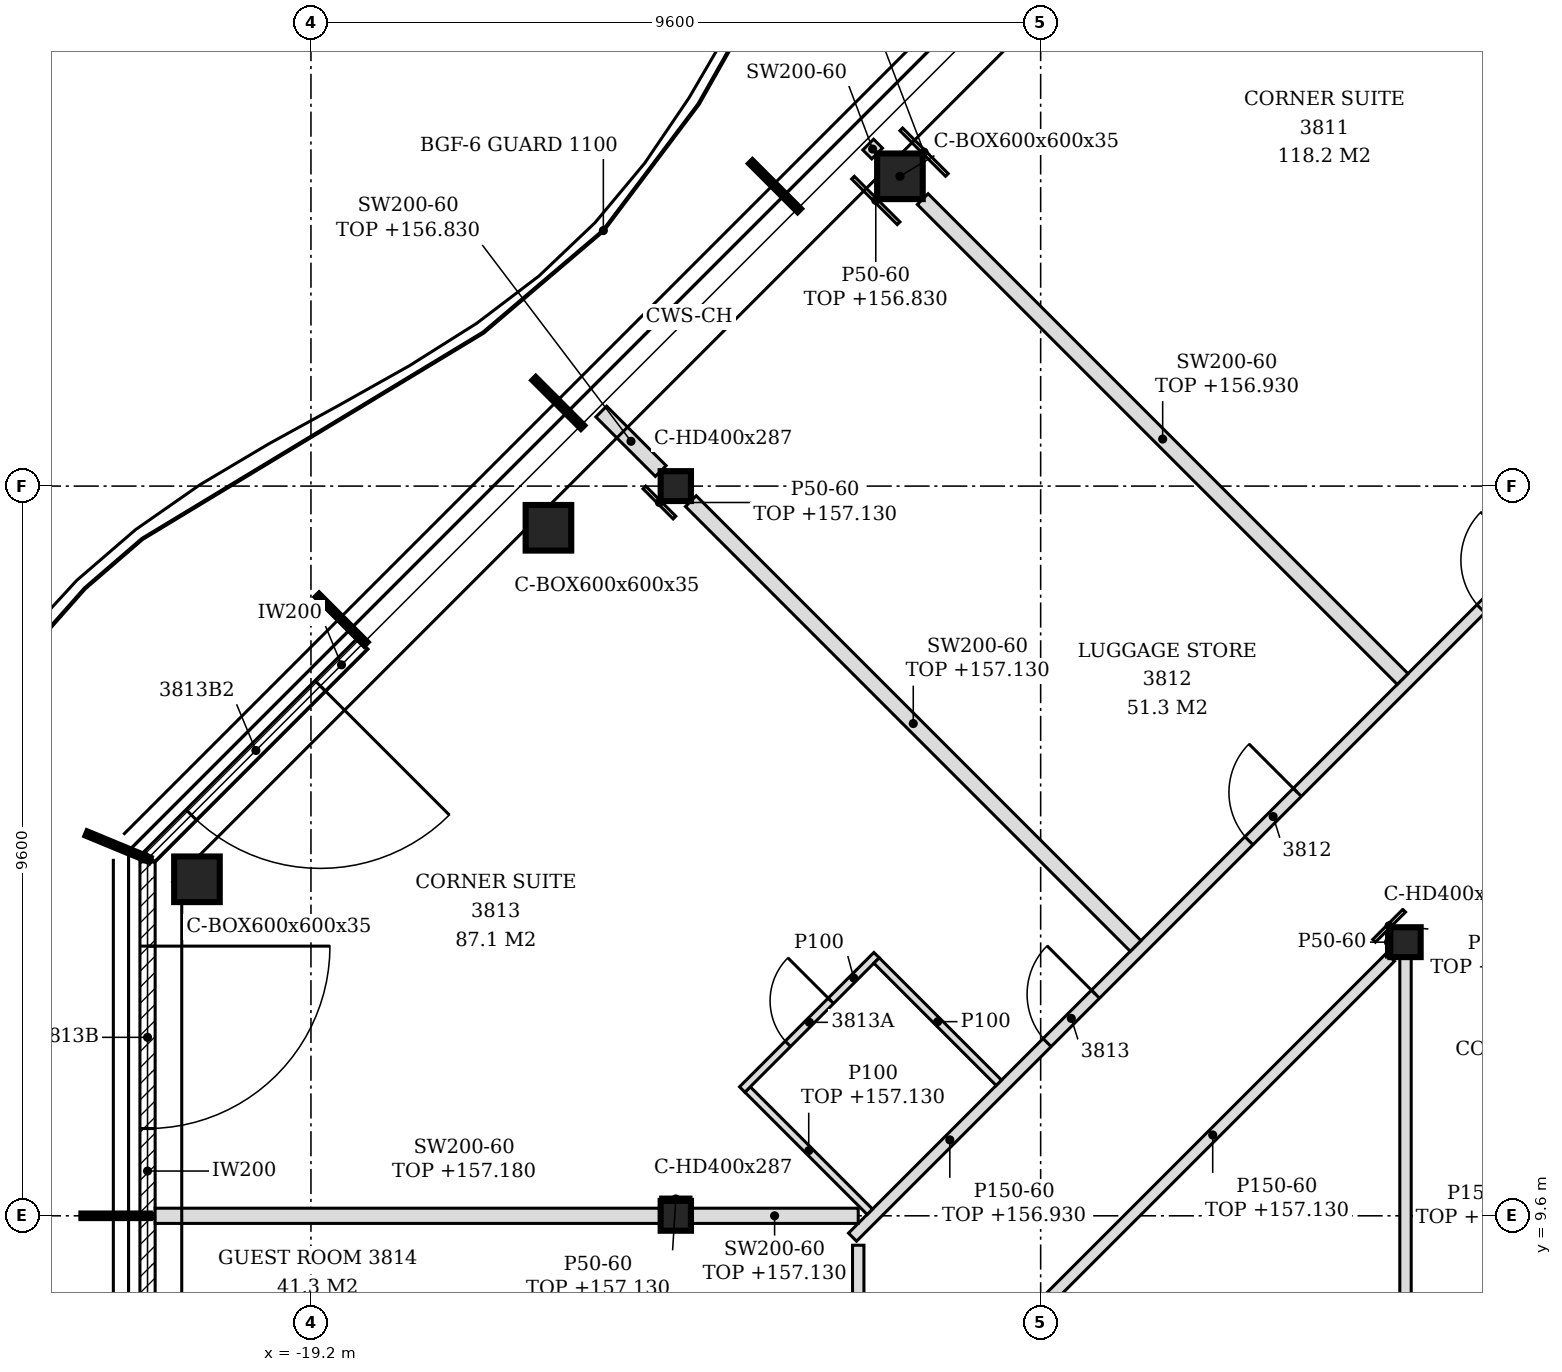
"""IFC4 building model, lengths in metres.
Left out: names, types, materials, properties, quantities, classifications, styles, units other than length and angle.
Written with IfcOpenShell. Run it as: python <this file> out.ifc"""

import sys

from ifc_helpers import new_model, si_unit, direction, frame, frame_2d, origin, origin_2d, place, context, subcontext, project, spatial, polyline, rectangle, hollow_rectangle, i_section, outline, extrude, element, fill, save


model = new_model("IFC4")
c1 = context("Model", 3, precision=1e-05, world=origin(), true_north=direction((0.0, 1.0)))
c2 = subcontext(c1, "Body", "Model", "MODEL_VIEW")
j1 = project(units=[si_unit("LENGTHUNIT", "METRE"), si_unit("PLANEANGLEUNIT", "RADIAN")], contexts=[c1])
p1 = place(None, origin())
s1 = spatial("IfcSite", under=j1, at=p1, CompositionType="ELEMENT")
p2 = place(p1, origin())
s2 = spatial("IfcBuilding", under=s1, at=p2, CompositionType="ELEMENT")
p3 = place(p2, frame((0.0, 0.0, 154.2)))
s3 = spatial("IfcBuildingStorey", under=s2, at=p3, CompositionType="ELEMENT", Elevation=154.2)
for number, where, z_axis, x_axis in (
    (1, (-11.451, 23.276, -0.15), (0.0, 0.0, 1.0), (1.0, 0.0, 0.0)),
    (2, (-16.076, 18.652, -0.15), (0.0, 0.0, 1.0), (1.0, 0.0, 0.0)),
    (3, (-20.7, 14.027, -0.15), (0.0, 0.0, 1.0), (1.0, 0.0, 0.0)),
):
    element("IfcColumn", number, at=place(p3, frame(where, z_axis=z_axis, x_axis=x_axis)), inside=s3, PredefinedType="COLUMN", context=c2, shape_type="SweptSolid", body=[
        extrude(hollow_rectangle(XDim=0.6, YDim=0.6, WallThickness=0.035, at=origin_2d()), origin(), (0.0, 0.0, 1.0), 3.6),
    ])
for number, where, z_axis, x_axis in (
    (4, (-4.8, 13.2, -0.15), (0.0, 0.0, 1.0), (1.0, 0.0, 0.0)),
    (5, (-14.4, 9.6, -0.15), (0.0, 0.0, 1.0), (1.0, 0.0, 0.0)),
    (6, (-14.4, 19.2, -0.15), (0.0, 0.0, 1.0), (1.0, 0.0, 0.0)),
):
    element("IfcColumn", number, at=place(p3, frame(where, z_axis=z_axis, x_axis=x_axis)), inside=s3, PredefinedType="COLUMN", context=c2, shape_type="SweptSolid", body=[
        extrude(i_section(OverallWidth=0.399, OverallDepth=0.393, WebThickness=0.023, FlangeThickness=0.037, FilletRadius=0.015, at=origin_2d()), origin(), (0.0, 0.0, 1.0), 3.6),
    ])
p4 = place(p3, frame((-18.521, 17.126, 0.0), z_axis=(0.0, 0.0, 1.0), x_axis=(-0.707106781187, -0.707106781187, 0.0)))
e7 = element("IfcWall", 7, at=p4, inside=s3, PredefinedType="NOTDEFINED", context=c2, shape_type="SweptSolid", body=[
    extrude(rectangle(XDim=3.962, YDim=0.2, at=frame_2d((1.981, 0.0))), origin(), (0.0, 0.0, 1.0), 3.45),
])
p5 = place(p4, frame((0.786, 0.0, 0.0)))
e8 = element("IfcOpeningElement", 8, at=p5, cuts=e7, PredefinedType="OPENING", context=c2, shape_type="SweptSolid", body=[
    extrude(rectangle(XDim=2.4, YDim=2.4, at=frame_2d((1.2, 1.2))), frame((0.0, 0.11, 0.0), z_axis=(0.0, -1.0, 0.0), x_axis=(1.0, 0.0, 0.0)), (0.0, 0.0, 1.0), 0.22),
])
p6 = place(p3, frame((-21.35, 14.256, 0.0), z_axis=(0.0, 0.0, 1.0), x_axis=(0.0, -1.0, 0.0)))
e9 = element("IfcWall", 9, at=p6, inside=s3, PredefinedType="NOTDEFINED", context=c2, shape_type="SweptSolid", body=[
    extrude(rectangle(XDim=4.626, YDim=0.2, at=frame_2d((2.313, 0.0))), origin(), (0.0, 0.0, 1.0), 3.45),
])
p7 = place(p6, frame((1.108, 0.0, 0.0)))
e10 = element("IfcOpeningElement", 10, at=p7, cuts=e9, PredefinedType="OPENING", context=c2, shape_type="SweptSolid", body=[
    extrude(rectangle(XDim=2.4, YDim=2.4, at=frame_2d((1.2, 1.2))), frame((0.0, 0.11, 0.0), z_axis=(0.0, -1.0, 0.0), x_axis=(1.0, 0.0, 0.0)), (0.0, 0.0, 1.0), 0.22),
])
p8 = place(p3, frame((-21.35, 9.57, 0.0), z_axis=(0.0, 0.0, 1.0), x_axis=(0.0, -1.0, 0.0)))
e11 = element("IfcWall", 11, at=p8, inside=s3, PredefinedType="NOTDEFINED", context=c2, shape_type="SweptSolid", body=[
    extrude(rectangle(XDim=4.74, YDim=0.2, at=frame_2d((2.37, 0.0))), origin(), (0.0, 0.0, 1.0), 3.45),
])
p9 = place(p8, frame((1.17, 0.0, 0.0)))
e12 = element("IfcOpeningElement", 12, at=p9, cuts=e11, PredefinedType="OPENING", context=c2, shape_type="SweptSolid", body=[
    extrude(rectangle(XDim=2.4, YDim=2.4, at=frame_2d((1.2, 1.2))), frame((0.0, 0.11, 0.0), z_axis=(0.0, -1.0, 0.0), x_axis=(1.0, 0.0, 0.0)), (0.0, 0.0, 1.0), 0.22),
])
p10 = place(p3, frame((-12.0, -4.7, 0.0), z_axis=(0.0, 0.0, 1.0), x_axis=(0.0, 1.0, 0.0)))
e13 = element("IfcWall", 13, at=p10, inside=s3, PredefinedType="PARTITIONING", context=c2, shape_type="SweptSolid", body=[
    extrude(outline(polyline([(0.0, 0.0), (13.913, 0.0), (13.913, 3.45), (9.6, 3.45), (9.598, 2.93), (9.4, 2.93), (9.398, 3.45), (4.8, 3.45), (4.798, 2.93), (4.6, 2.93), (4.598, 3.45), (0.0, 3.45), (0.0, 0.0)])), frame((0.0, 0.075, 0.0), z_axis=(0.0, -1.0, 0.0), x_axis=(1.0, 0.0, 0.0)), (0.0, 0.0, 1.0), 0.15),
])
p11 = place(p10, frame((12.347, 0.0, 0.0)))
e14 = element("IfcOpeningElement", 14, at=p11, cuts=e13, PredefinedType="OPENING", context=c2, shape_type="SweptSolid", body=[
    extrude(rectangle(XDim=0.9, YDim=2.1, at=frame_2d((0.45, 1.05))), frame((0.0, 0.085, 0.0), z_axis=(0.0, -1.0, 0.0), x_axis=(1.0, 0.0, 0.0)), (0.0, 0.0, 1.0), 0.17),
])
p12 = place(p10, frame((5.45, 0.0, 0.0)))
e15 = element("IfcOpeningElement", 15, at=p12, cuts=e13, PredefinedType="OPENING", context=c2, shape_type="SweptSolid", body=[
    extrude(rectangle(XDim=0.9, YDim=2.1, at=frame_2d((0.45, 1.05))), frame((0.0, 0.085, 0.0), z_axis=(0.0, -1.0, 0.0), x_axis=(1.0, 0.0, 0.0)), (0.0, 0.0, 1.0), 0.17),
])
p13 = place(p10, frame((1.777, 0.0, 0.0)))
e16 = element("IfcOpeningElement", 16, at=p13, cuts=e13, PredefinedType="OPENING", context=c2, shape_type="SweptSolid", body=[
    extrude(rectangle(XDim=0.9, YDim=2.1, at=frame_2d((0.45, 1.05))), frame((0.0, 0.085, 0.0), z_axis=(0.0, -1.0, 0.0), x_axis=(1.0, 0.0, 0.0)), (0.0, 0.0, 1.0), 0.17),
])
p14 = place(p3, frame((-4.8, 2.596, 0.0), z_axis=(0.0, 0.0, 1.0), x_axis=(0.0, 1.0, 0.0)))
e17 = element("IfcWall", 17, at=p14, inside=s3, PredefinedType="PARTITIONING", context=c2, shape_type="SweptSolid", body=[
    extrude(rectangle(XDim=10.407, YDim=0.15, at=frame_2d((5.204, 0.0))), origin(), (0.0, 0.0, 1.0), 2.83),
])
p15 = place(p14, frame((2.954, 0.0, 0.0)))
e18 = element("IfcOpeningElement", 18, at=p15, cuts=e17, PredefinedType="OPENING", context=c2, shape_type="SweptSolid", body=[
    extrude(rectangle(XDim=0.9, YDim=2.1, at=frame_2d((0.45, 1.05))), frame((0.0, 0.085, 0.0), z_axis=(0.0, -1.0, 0.0), x_axis=(1.0, 0.0, 0.0)), (0.0, 0.0, 1.0), 0.17),
])
p16 = place(p3, frame((-9.675, 8.325, 0.0), z_axis=(0.0, 0.0, 1.0), x_axis=(0.707106781187, 0.707106781187, 0.0)))
e19 = element("IfcWall", 19, at=p16, inside=s3, PredefinedType="PARTITIONING", context=c2, shape_type="SweptSolid", body=[
    extrude(rectangle(XDim=6.614, YDim=0.15, at=frame_2d((3.307, 0.0))), origin(), (0.0, 0.0, 1.0), 2.93),
])
p17 = place(p3, frame((-12.075, 9.319, 0.0), z_axis=(0.0, 0.0, 1.0), x_axis=(0.707106781187, 0.707106781187, 0.0)))
e20 = element("IfcWall", 20, at=p17, inside=s3, PredefinedType="PARTITIONING", context=c2, shape_type="SweptSolid", body=[
    extrude(rectangle(XDim=13.793, YDim=0.15, at=frame_2d((6.896, 0.0))), origin(), (0.0, 0.0, 1.0), 2.73),
])
p18 = place(p17, frame((11.692, 0.0, 0.0)))
e21 = element("IfcOpeningElement", 21, at=p18, cuts=e20, PredefinedType="OPENING", context=c2, shape_type="SweptSolid", body=[
    extrude(rectangle(XDim=0.9, YDim=2.1, at=frame_2d((0.45, 1.05))), frame((0.0, 0.085, 0.0), z_axis=(0.0, -1.0, 0.0), x_axis=(1.0, 0.0, 0.0)), (0.0, 0.0, 1.0), 0.17),
])
p19 = place(p17, frame((7.376, 0.0, 0.0)))
e22 = element("IfcOpeningElement", 22, at=p19, cuts=e20, PredefinedType="OPENING", context=c2, shape_type="SweptSolid", body=[
    extrude(rectangle(XDim=0.9, YDim=2.1, at=frame_2d((0.45, 1.05))), frame((0.0, 0.085, 0.0), z_axis=(0.0, -1.0, 0.0), x_axis=(1.0, 0.0, 0.0)), (0.0, 0.0, 1.0), 0.17),
])
p20 = place(p17, frame((3.62, 0.0, 0.0)))
e23 = element("IfcOpeningElement", 23, at=p20, cuts=e20, PredefinedType="OPENING", context=c2, shape_type="SweptSolid", body=[
    extrude(rectangle(XDim=0.9, YDim=2.1, at=frame_2d((0.45, 1.05))), frame((0.0, 0.085, 0.0), z_axis=(0.0, -1.0, 0.0), x_axis=(1.0, 0.0, 0.0)), (0.0, 0.0, 1.0), 0.17),
])
p21 = place(p3, frame((-21.25, 9.6, 0.0), z_axis=(0.0, 0.0, 1.0), x_axis=(1.0, 0.0, 0.0)))
e24 = element("IfcWall", 24, at=p21, inside=s3, PredefinedType="PARTITIONING", context=c2, shape_type="SweptSolid", body=[
    extrude(outline(polyline([(0.0, 0.0), (6.65, 0.0), (6.65, 2.98), (0.7, 2.98), (0.698, 2.93), (0.4, 2.93), (0.398, 2.98), (0.0, 2.98), (0.0, 0.0)])), frame((0.0, 0.1, 0.0), z_axis=(0.0, -1.0, 0.0), x_axis=(1.0, 0.0, 0.0)), (0.0, 0.0, 1.0), 0.2),
])
p22 = place(p3, frame((-14.2, 9.6, 0.0), z_axis=(0.0, 0.0, 1.0), x_axis=(1.0, 0.0, 0.0)))
e25 = element("IfcWall", 25, at=p22, inside=s3, PredefinedType="PARTITIONING", context=c2, shape_type="SweptSolid", body=[
    extrude(rectangle(XDim=2.2, YDim=0.2, at=frame_2d((1.1, 0.0))), origin(), (0.0, 0.0, 1.0), 2.93),
])
p23 = place(p3, frame((-11.847, 9.653, 0.0), z_axis=(0.0, 0.0, 1.0), x_axis=(-0.707106781187, 0.707106781187, 0.0)))
e26 = element("IfcWall", 26, at=p23, inside=s3, PredefinedType="PARTITIONING", context=c2, shape_type="SweptSolid", body=[
    extrude(rectangle(XDim=2.275, YDim=0.1, at=frame_2d((1.137, 0.0))), origin(), (0.0, 0.0, 1.0), 2.93),
])
p24 = place(p3, frame((-13.526, 11.262, 0.0), z_axis=(0.0, 0.0, 1.0), x_axis=(0.707106781187, 0.707106781187, 0.0)))
e27 = element("IfcWall", 27, at=p24, inside=s3, PredefinedType="PARTITIONING", context=c2, shape_type="SweptSolid", body=[
    extrude(rectangle(XDim=2.5, YDim=0.1, at=frame_2d((1.25, 0.0))), origin(), (0.0, 0.0, 1.0), 3.45),
])
p25 = place(p24, frame((0.85, 0.0, 0.0)))
e28 = element("IfcOpeningElement", 28, at=p25, cuts=e27, PredefinedType="OPENING", context=c2, shape_type="SweptSolid", body=[
    extrude(rectangle(XDim=0.8, YDim=2.1, at=frame_2d((0.4, 1.05))), frame((0.0, 0.06, 0.0), z_axis=(0.0, -1.0, 0.0), x_axis=(1.0, 0.0, 0.0)), (0.0, 0.0, 1.0), 0.12),
])
p26 = place(p3, frame((-10.15, 11.35, 0.0), z_axis=(0.0, 0.0, 1.0), x_axis=(-0.707160441348, 0.707053116953, 0.0)))
e29 = element("IfcWall", 29, at=p26, inside=s3, PredefinedType="PARTITIONING", context=c2, shape_type="SweptSolid", body=[
    extrude(rectangle(XDim=2.275, YDim=0.1, at=frame_2d((1.137, 0.0))), origin(), (0.0, 0.0, 1.0), 3.45),
])
p27 = place(p3, frame((-8.35, 13.15, 0.0), z_axis=(0.0, 0.0, 1.0), x_axis=(-0.707092030896, 0.707121531169, 0.0)))
e30 = element("IfcWall", 30, at=p27, inside=s3, PredefinedType="PARTITIONING", context=c2, shape_type="SweptSolid", body=[
    extrude(rectangle(XDim=8.276, YDim=0.2, at=frame_2d((4.138, 0.0))), origin(), (0.0, 0.0, 1.0), 2.93),
])
p28 = place(p3, frame((-4.838, 16.662, 0.0), z_axis=(0.0, 0.0, 1.0), x_axis=(-0.707120452615, 0.707093109494, 0.0)))
e31 = element("IfcWall", 31, at=p28, inside=s3, PredefinedType="PARTITIONING", context=c2, shape_type="SweptSolid", body=[
    extrude(rectangle(XDim=8.929, YDim=0.2, at=frame_2d((4.464, 0.0))), origin(), (0.0, 0.0, 1.0), 2.73),
])
p29 = place(p3, frame((-14.598, 19.398, 0.0), z_axis=(0.0, 0.0, 1.0), x_axis=(-0.707106781187, 0.707106781187, 0.0)))
e32 = element("IfcWall", 32, at=p29, inside=s3, PredefinedType="PARTITIONING", context=c2, shape_type="SweptSolid", body=[
    extrude(rectangle(XDim=1.107, YDim=0.2, at=frame_2d((0.554, 0.0))), origin(), (0.0, 0.0, 1.0), 2.63),
])
p30 = place(p3, frame((-11.752, 23.576, 0.0), z_axis=(0.0, 0.0, 1.0), x_axis=(-0.707106781187, 0.707106781187, 0.0)))
e33 = element("IfcWall", 33, at=p30, inside=s3, PredefinedType="PARTITIONING", context=c2, shape_type="SweptSolid", body=[
    extrude(rectangle(XDim=0.166, YDim=0.2, at=frame_2d((0.083, 0.0))), origin(), (0.0, 0.0, 1.0), 3.45),
])
p31 = place(p3, frame((-5.024, 13.003, 0.0), z_axis=(0.0, 0.0, 1.0), x_axis=(0.0, 1.0, 0.0)))
e34 = element("IfcWall", 34, at=p31, inside=s3, PredefinedType="PARTITIONING", context=c2, shape_type="SweptSolid", body=[
    extrude(rectangle(XDim=0.393, YDim=0.05, at=frame_2d((0.197, 0.0))), origin(), (0.0, 0.0, 1.0), 3.45),
])
p32 = place(p3, frame((-5.214, 13.218, 0.0), z_axis=(0.0, 0.0, 1.0), x_axis=(0.707106781187, 0.707106781187, 0.0)))
e35 = element("IfcWall", 35, at=p32, inside=s3, PredefinedType="PARTITIONING", context=c2, shape_type="SweptSolid", body=[
    extrude(rectangle(XDim=0.56, YDim=0.05, at=frame_2d((0.28, 0.0))), origin(), (0.0, 0.0, 1.0), 2.73),
])
p33 = place(p3, frame((-14.6, 9.822, 0.0), z_axis=(0.0, 0.0, 1.0), x_axis=(1.0, 0.0, 0.0)))
e36 = element("IfcWall", 36, at=p33, inside=s3, PredefinedType="PARTITIONING", context=c2, shape_type="SweptSolid", body=[
    extrude(rectangle(XDim=0.399, YDim=0.05, at=frame_2d((0.2, 0.0))), origin(), (0.0, 0.0, 1.0), 2.93),
])
p34 = place(p3, frame((-14.418, 18.786, 0.0), z_axis=(0.0, 0.0, 1.0), x_axis=(-0.707106781187, 0.707106781187, 0.0)))
e37 = element("IfcWall", 37, at=p34, inside=s3, PredefinedType="PARTITIONING", context=c2, shape_type="SweptSolid", body=[
    extrude(rectangle(XDim=0.56, YDim=0.05, at=frame_2d((0.28, 0.0))), origin(), (0.0, 0.0, 1.0), 2.93),
])
p35 = place(p3, frame((-11.469, 22.658, 0.0), z_axis=(0.0, 0.0, 1.0), x_axis=(-0.706962899457, 0.707250633645, 0.0)))
e38 = element("IfcWall", 38, at=p35, inside=s3, PredefinedType="PARTITIONING", context=c2, shape_type="SweptSolid", body=[
    extrude(rectangle(XDim=0.848, YDim=0.05, at=frame_2d((0.424, 0.0))), origin(), (0.0, 0.0, 1.0), 2.63),
])
p36 = place(p3, frame((-10.834, 23.293, 0.0), z_axis=(0.0, 0.0, 1.0), x_axis=(-0.707250633645, 0.706962899457, 0.0)))
e39 = element("IfcWall", 39, at=p36, inside=s3, PredefinedType="PARTITIONING", context=c2, shape_type="SweptSolid", body=[
    extrude(rectangle(XDim=0.848, YDim=0.05, at=frame_2d((0.424, 0.0))), origin(), (0.0, 0.0, 1.0), 2.93),
])
p37 = place(p5, origin())
e40 = element("IfcDoor", 40, at=p37, inside=s3, OperationType="SINGLE_SWING_LEFT", PredefinedType="DOOR", context=c2, shape_type="SweptSolid", body=[
    extrude(rectangle(XDim=2.4, YDim=2.4, at=frame_2d((1.2, 1.2))), frame((0.0, 0.025, 0.0), z_axis=(0.0, -1.0, 0.0), x_axis=(1.0, 0.0, 0.0)), (0.0, 0.0, 1.0), 0.05),
])
fill(e8, e40)
p38 = place(p7, origin())
e41 = element("IfcDoor", 41, at=p38, inside=s3, OperationType="SINGLE_SWING_LEFT", PredefinedType="DOOR", context=c2, shape_type="SweptSolid", body=[
    extrude(rectangle(XDim=2.4, YDim=2.4, at=frame_2d((1.2, 1.2))), frame((0.0, 0.025, 0.0), z_axis=(0.0, -1.0, 0.0), x_axis=(1.0, 0.0, 0.0)), (0.0, 0.0, 1.0), 0.05),
])
fill(e10, e41)
p39 = place(p18, origin())
e42 = element("IfcDoor", 42, at=p39, inside=s3, OperationType="SINGLE_SWING_RIGHT", PredefinedType="DOOR", context=c2, shape_type="SweptSolid", body=[
    extrude(rectangle(XDim=0.9, YDim=2.1, at=frame_2d((0.45, 1.05))), frame((0.0, 0.025, 0.0), z_axis=(0.0, -1.0, 0.0), x_axis=(1.0, 0.0, 0.0)), (0.0, 0.0, 1.0), 0.05),
])
fill(e21, e42)
p40 = place(p19, origin())
e43 = element("IfcDoor", 43, at=p40, inside=s3, OperationType="SINGLE_SWING_RIGHT", PredefinedType="DOOR", context=c2, shape_type="SweptSolid", body=[
    extrude(rectangle(XDim=0.9, YDim=2.1, at=frame_2d((0.45, 1.05))), frame((0.0, 0.025, 0.0), z_axis=(0.0, -1.0, 0.0), x_axis=(1.0, 0.0, 0.0)), (0.0, 0.0, 1.0), 0.05),
])
fill(e22, e43)
p41 = place(p20, origin())
e44 = element("IfcDoor", 44, at=p41, inside=s3, OperationType="SINGLE_SWING_RIGHT", PredefinedType="DOOR", context=c2, shape_type="SweptSolid", body=[
    extrude(rectangle(XDim=0.9, YDim=2.1, at=frame_2d((0.45, 1.05))), frame((0.0, 0.025, 0.0), z_axis=(0.0, -1.0, 0.0), x_axis=(1.0, 0.0, 0.0)), (0.0, 0.0, 1.0), 0.05),
])
fill(e23, e44)
p42 = place(p25, origin())
e45 = element("IfcDoor", 45, at=p42, inside=s3, OperationType="SINGLE_SWING_RIGHT", PredefinedType="DOOR", context=c2, shape_type="SweptSolid", body=[
    extrude(rectangle(XDim=0.8, YDim=2.1, at=frame_2d((0.4, 1.05))), frame((0.0, 0.025, 0.0), z_axis=(0.0, -1.0, 0.0), x_axis=(1.0, 0.0, 0.0)), (0.0, 0.0, 1.0), 0.05),
])
fill(e28, e45)
save(model, sys.argv[1])
